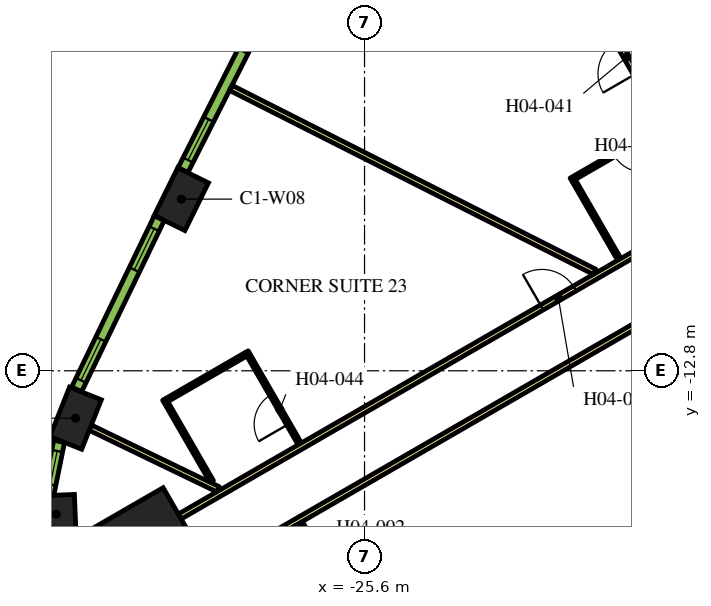
"""IFC4 building model, lengths in metres.
Left out: names, types, materials, properties, quantities, classifications, styles, units other than length and angle.
Written with IfcOpenShell. Run it as: python <this file> out.ifc"""

import sys

from ifc_helpers import new_model, si_unit, direction, frame, frame_2d, origin, origin_2d, place, context, subcontext, project, spatial, rectangle, extrude, element, fill, save


model = new_model("IFC4")
c1 = context("Model", 3, precision=1e-05, world=origin(), true_north=direction((0.0, 1.0)))
c2 = subcontext(c1, "Body", "Model", "MODEL_VIEW")
j1 = project(units=[si_unit("LENGTHUNIT", "METRE"), si_unit("PLANEANGLEUNIT", "RADIAN")], contexts=[c1])
p1 = place(None, origin())
s1 = spatial("IfcSite", under=j1, at=p1, CompositionType="ELEMENT")
p2 = place(p1, origin())
s2 = spatial("IfcBuilding", under=s1, at=p2, CompositionType="ELEMENT")
p3 = place(p2, frame((0.0, 0.0, 62.7)))
s3 = spatial("IfcBuildingStorey", under=s2, at=p3, CompositionType="ELEMENT", Elevation=62.7)
p4 = place(p3, frame((-31.522, -18.199, 0.0), z_axis=(0.0, 0.0, 1.0), x_axis=(-0.866025403784, -0.5, 0.0)))
e1 = element("IfcColumn", 1, at=p4, inside=s3, PredefinedType="COLUMN", context=c2, shape_type="SweptSolid", body=[
    extrude(rectangle(XDim=3.4, YDim=3.4, at=origin_2d()), origin(), (0.0, 0.0, 1.0), 3.9),
])
for number, where, z_axis, x_axis in (
    (2, (-30.421, -8.284, 0.0), (0.0, 0.0, 1.0), (-0.443, -0.897, 0.0)),
    (3, (-33.203, -14.047, 0.0), (0.0, 0.0, 1.0), (-0.369, -0.929, 0.0)),
):
    element("IfcColumn", number, at=place(p3, frame(where, z_axis=z_axis, x_axis=x_axis)), inside=s3, PredefinedType="COLUMN", context=c2, shape_type="SweptSolid", body=[
        extrude(rectangle(XDim=1.4, YDim=0.9, at=origin_2d()), origin(), (0.0, 0.0, 1.0), 3.9),
    ])
p5 = place(p3, frame((-33.713, -16.574, 0.0), z_axis=(0.0, 0.0, 1.0), x_axis=(0.041582693819, -0.999135065732, 0.0)))
e4 = element("IfcColumn", 4, at=p5, inside=s3, PredefinedType="COLUMN", context=c2, shape_type="SweptSolid", body=[
    extrude(rectangle(XDim=1.0, YDim=1.0, at=origin_2d()), origin(), (0.0, 0.0, 1.0), 3.9),
])
p6 = place(p3, frame((-16.412, -8.523, 0.0), z_axis=(0.0, 0.0, 1.0), x_axis=(-0.500001929737, 0.866024289647, 0.0)))
e5 = element("IfcWall", 5, at=p6, inside=s3, PredefinedType="PARTITIONING", context=c2, shape_type="SweptSolid", body=[
    extrude(rectangle(XDim=5.268, YDim=0.15, at=frame_2d((2.634, 0.0))), origin(), (0.0, 0.0, 1.0), 2.75),
])
p7 = place(p6, frame((4.088, 0.0, 0.0)))
e6 = element("IfcOpeningElement", 6, at=p7, cuts=e5, PredefinedType="OPENING", context=c2, shape_type="SweptSolid", body=[
    extrude(rectangle(XDim=1.0, YDim=2.1, at=frame_2d((0.5, 1.05))), frame((0.0, 0.085, 0.0), z_axis=(0.0, -1.0, 0.0), x_axis=(1.0, 0.0, 0.0)), (0.0, 0.0, 1.0), 0.17),
])
p8 = place(p3, frame((-30.463, -16.635, 0.0), z_axis=(0.0, 0.0, 1.0), x_axis=(0.866022394896, 0.500005211512, 0.0)))
e7 = element("IfcWall", 7, at=p8, inside=s3, PredefinedType="PARTITIONING", context=c2, shape_type="SweptSolid", body=[
    extrude(rectangle(XDim=16.144, YDim=0.15, at=frame_2d((8.072, 0.0))), origin(), (0.0, 0.0, 1.0), 2.75),
])
p9 = place(p8, frame((11.004, 0.0, 0.0)))
e8 = element("IfcOpeningElement", 8, at=p9, cuts=e7, PredefinedType="OPENING", context=c2, shape_type="SweptSolid", body=[
    extrude(rectangle(XDim=1.0, YDim=2.1, at=frame_2d((0.5, 1.05))), frame((0.0, 0.085, 0.0), z_axis=(0.0, -1.0, 0.0), x_axis=(1.0, 0.0, 0.0)), (0.0, 0.0, 1.0), 0.17),
])
p10 = place(p3, frame((-15.587, -9.952, 0.0), z_axis=(0.0, 0.0, 1.0), x_axis=(-0.866022197818, -0.500005552856, 0.0)))
e9 = element("IfcWall", 9, at=p10, inside=s3, PredefinedType="PARTITIONING", context=c2, shape_type="SweptSolid", body=[
    extrude(rectangle(XDim=16.224, YDim=0.15, at=frame_2d((8.112, 0.0))), origin(), (0.0, 0.0, 1.0), 2.75),
])
p11 = place(p10, frame((0.527, 0.0, 0.0)))
e10 = element("IfcOpeningElement", 10, at=p11, cuts=e9, PredefinedType="OPENING", context=c2, shape_type="SweptSolid", body=[
    extrude(rectangle(XDim=1.1, YDim=2.1, at=frame_2d((0.55, 1.05))), frame((0.0, 0.085, 0.0), z_axis=(0.0, -1.0, 0.0), x_axis=(1.0, 0.0, 0.0)), (0.0, 0.0, 1.0), 0.17),
])
p12 = place(p3, frame((-32.817, -14.296, 0.0), z_axis=(0.0, 0.0, 1.0), x_axis=(0.900616957918, -0.434613730927, 0.0)))
e11 = element("IfcWall", 11, at=p12, inside=s3, PredefinedType="PARTITIONING", context=c2, shape_type="SweptSolid", body=[
    extrude(rectangle(XDim=3.733, YDim=0.15, at=frame_2d((1.867, 0.0))), origin(), (0.0, 0.0, 1.0), 2.75),
])
p13 = place(p3, frame((-29.12, -5.356, 0.0), z_axis=(0.0, 0.0, 1.0), x_axis=(0.892401965553, -0.451241323327, 0.0)))
e12 = element("IfcWall", 12, at=p13, inside=s3, PredefinedType="PARTITIONING", context=c2, shape_type="SweptSolid", body=[
    extrude(rectangle(XDim=10.729, YDim=0.15, at=frame_2d((5.364, 0.0))), origin(), (0.0, 0.0, 1.0), 2.75),
])
p14 = place(p3, frame((-25.829, -19.3, 0.0), z_axis=(0.0, 0.0, 1.0), x_axis=(-0.50005036918, 0.865996321171, 0.0)))
e13 = element("IfcWall", 13, at=p14, inside=s3, PredefinedType="PARTITIONING", context=c2, shape_type="SweptSolid", body=[
    extrude(rectangle(XDim=2.9, YDim=0.1, at=frame_2d((1.45, 0.0))), origin(), (0.0, 0.0, 1.0), 2.75),
])
p15 = place(p14, frame((1.4, 0.0, 0.0)))
e14 = element("IfcOpeningElement", 14, at=p15, cuts=e13, PredefinedType="OPENING", context=c2, shape_type="SweptSolid", body=[
    extrude(rectangle(XDim=0.9, YDim=2.1, at=frame_2d((0.45, 1.05))), frame((0.0, 0.06, 0.0), z_axis=(0.0, -1.0, 0.0), x_axis=(1.0, 0.0, 0.0)), (0.0, 0.0, 1.0), 0.12),
])
p16 = place(p3, frame((-17.74, -6.373, 0.0), z_axis=(0.0, 0.0, 1.0), x_axis=(-0.866018616679, -0.500011755427, 0.0)))
e15 = element("IfcWall", 15, at=p16, inside=s3, PredefinedType="PARTITIONING", context=c2, shape_type="SweptSolid", body=[
    extrude(rectangle(XDim=2.8, YDim=0.1, at=frame_2d((1.4, 0.0))), origin(), (0.0, 0.0, 1.0), 2.75),
])
p17 = place(p16, frame((0.6, 0.0, 0.0)))
e16 = element("IfcOpeningElement", 16, at=p17, cuts=e15, PredefinedType="OPENING", context=c2, shape_type="SweptSolid", body=[
    extrude(rectangle(XDim=0.9, YDim=2.1, at=frame_2d((0.45, 1.05))), frame((0.0, 0.06, 0.0), z_axis=(0.0, -1.0, 0.0), x_axis=(1.0, 0.0, 0.0)), (0.0, 0.0, 1.0), 0.12),
])
p18 = place(p3, frame((-20.092, -7.8, 0.0), z_axis=(0.0, 0.0, 1.0), x_axis=(0.499940577336, -0.866059708757, 0.0)))
e17 = element("IfcWall", 17, at=p18, inside=s3, PredefinedType="PARTITIONING", context=c2, shape_type="SweptSolid", body=[
    extrude(rectangle(XDim=2.39, YDim=0.1, at=frame_2d((1.195, 0.0))), origin(), (0.0, 0.0, 1.0), 2.75),
])
p19 = place(p3, frame((-27.304, -14.725, 0.0), z_axis=(0.0, 0.0, 1.0), x_axis=(-0.49998411664, 0.866034573852, 0.0)))
e18 = element("IfcWall", 18, at=p19, inside=s3, PredefinedType="PARTITIONING", context=c2, shape_type="SweptSolid", body=[
    extrude(rectangle(XDim=2.8, YDim=0.1, at=frame_2d((1.4, 0.0))), origin(), (0.0, 0.0, 1.0), 2.75),
])
p20 = place(p19, frame((0.6, 0.0, 0.0)))
e19 = element("IfcOpeningElement", 19, at=p20, cuts=e18, PredefinedType="OPENING", context=c2, shape_type="SweptSolid", body=[
    extrude(rectangle(XDim=0.9, YDim=2.1, at=frame_2d((0.45, 1.05))), frame((0.0, 0.06, 0.0), z_axis=(0.0, -1.0, 0.0), x_axis=(1.0, 0.0, 0.0)), (0.0, 0.0, 1.0), 0.12),
])
p21 = place(p3, frame((-28.722, -12.368, 0.0), z_axis=(0.0, 0.0, 1.0), x_axis=(-0.866050077142, -0.499957262057, 0.0)))
e20 = element("IfcWall", 20, at=p21, inside=s3, PredefinedType="PARTITIONING", context=c2, shape_type="SweptSolid", body=[
    extrude(rectangle(XDim=2.4, YDim=0.1, at=frame_2d((1.2, 0.0))), origin(), (0.0, 0.0, 1.0), 2.75),
])
p22 = place(p3, frame((-29.619, -15.715, 0.0), z_axis=(0.0, 0.0, 1.0), x_axis=(-0.500004234368, 0.866022959057, 0.0)))
e21 = element("IfcWall", 21, at=p22, inside=s3, PredefinedType="PARTITIONING", context=c2, shape_type="SweptSolid", body=[
    extrude(rectangle(XDim=2.5, YDim=0.1, at=frame_2d((1.25, 0.0))), origin(), (0.0, 0.0, 1.0), 2.75),
])
p23 = place(p3, frame((-28.122, -3.06, 0.0), z_axis=(0.0, 0.0, 1.0), x_axis=(-0.451233929645, -0.892405704115, 0.0)))
e22 = element("IfcWall", 22, at=p23, inside=s3, PredefinedType="SOLIDWALL", context=c2, shape_type="SweptSolid", body=[
    extrude(rectangle(XDim=4.998, YDim=0.29, at=frame_2d((2.499, 0.0))), origin(), (0.0, 0.0, 1.0), 3.65),
])
p24 = place(p23, frame((0.297, 0.0, 0.9)))
e23 = element("IfcOpeningElement", 23, at=p24, cuts=e22, PredefinedType="OPENING", context=c2, shape_type="SweptSolid", body=[
    extrude(rectangle(XDim=1.2, YDim=2.15, at=frame_2d((0.6, 1.075))), frame((0.0, 0.155, 0.0), z_axis=(0.0, -1.0, 0.0), x_axis=(1.0, 0.0, 0.0)), (0.0, 0.0, 1.0), 0.31),
])
p25 = place(p23, frame((3.501, 0.0, 0.9)))
e24 = element("IfcOpeningElement", 24, at=p25, cuts=e22, PredefinedType="OPENING", context=c2, shape_type="SweptSolid", body=[
    extrude(rectangle(XDim=1.2, YDim=2.15, at=frame_2d((0.6, 1.075))), frame((0.0, 0.155, 0.0), z_axis=(0.0, -1.0, 0.0), x_axis=(1.0, 0.0, 0.0)), (0.0, 0.0, 1.0), 0.31),
])
p26 = place(p3, frame((-31.0, -8.782, 0.0), z_axis=(0.0, 0.0, 1.0), x_axis=(-0.434664499056, -0.900592456808, 0.0)))
e25 = element("IfcWall", 25, at=p26, inside=s3, PredefinedType="SOLIDWALL", context=c2, shape_type="SweptSolid", body=[
    extrude(rectangle(XDim=5.006, YDim=0.29, at=frame_2d((2.503, 0.0))), origin(), (0.0, 0.0, 1.0), 3.65),
])
p27 = place(p26, frame((0.31, 0.0, 0.9)))
e26 = element("IfcOpeningElement", 26, at=p27, cuts=e25, PredefinedType="OPENING", context=c2, shape_type="SweptSolid", body=[
    extrude(rectangle(XDim=1.2, YDim=2.15, at=frame_2d((0.6, 1.075))), frame((0.0, 0.155, 0.0), z_axis=(0.0, -1.0, 0.0), x_axis=(1.0, 0.0, 0.0)), (0.0, 0.0, 1.0), 0.31),
])
p28 = place(p26, frame((3.541, 0.0, 0.9)))
e27 = element("IfcOpeningElement", 27, at=p28, cuts=e25, PredefinedType="OPENING", context=c2, shape_type="SweptSolid", body=[
    extrude(rectangle(XDim=1.2, YDim=2.15, at=frame_2d((0.6, 1.075))), frame((0.0, 0.155, 0.0), z_axis=(0.0, -1.0, 0.0), x_axis=(1.0, 0.0, 0.0)), (0.0, 0.0, 1.0), 0.31),
])
p29 = place(p3, frame((-33.637, -14.657, 0.0), z_axis=(0.0, 0.0, 1.0), x_axis=(-0.198106888228, -0.980180422594, 0.0)))
e28 = element("IfcWall", 28, at=p29, inside=s3, PredefinedType="SOLIDWALL", context=c2, shape_type="SweptSolid", body=[
    extrude(rectangle(XDim=1.415, YDim=0.29, at=frame_2d((0.708, 0.0))), origin(), (0.0, 0.0, 1.0), 3.65),
])
p30 = place(p29, frame((0.257, 0.0, 0.9)))
e29 = element("IfcOpeningElement", 29, at=p30, cuts=e28, PredefinedType="OPENING", context=c2, shape_type="SweptSolid", body=[
    extrude(rectangle(XDim=0.9, YDim=2.15, at=frame_2d((0.45, 1.075))), frame((0.0, 0.155, 0.0), z_axis=(0.0, -1.0, 0.0), x_axis=(1.0, 0.0, 0.0)), (0.0, 0.0, 1.0), 0.31),
])
p31 = place(p7, origin())
e30 = element("IfcDoor", 30, at=p31, inside=s3, OperationType="SINGLE_SWING_RIGHT", PredefinedType="DOOR", context=c2, shape_type="SweptSolid", body=[
    extrude(rectangle(XDim=1.0, YDim=2.1, at=frame_2d((0.5, 1.05))), frame((0.0, 0.025, 0.0), z_axis=(0.0, -1.0, 0.0), x_axis=(1.0, 0.0, 0.0)), (0.0, 0.0, 1.0), 0.05),
])
fill(e6, e30)
p32 = place(p17, origin())
e31 = element("IfcDoor", 31, at=p32, inside=s3, OperationType="SINGLE_SWING_LEFT", PredefinedType="DOOR", context=c2, shape_type="SweptSolid", body=[
    extrude(rectangle(XDim=0.9, YDim=2.1, at=frame_2d((0.45, 1.05))), frame((0.0, 0.025, 0.0), z_axis=(0.0, -1.0, 0.0), x_axis=(1.0, 0.0, 0.0)), (0.0, 0.0, 1.0), 0.05),
])
fill(e16, e31)
p33 = place(p9, origin())
e32 = element("IfcDoor", 32, at=p33, inside=s3, OperationType="SINGLE_SWING_RIGHT", PredefinedType="DOOR", context=c2, shape_type="SweptSolid", body=[
    extrude(rectangle(XDim=1.0, YDim=2.1, at=frame_2d((0.5, 1.05))), frame((0.0, 0.025, 0.0), z_axis=(0.0, -1.0, 0.0), x_axis=(1.0, 0.0, 0.0)), (0.0, 0.0, 1.0), 0.05),
])
fill(e8, e32)
p34 = place(p20, origin())
e33 = element("IfcDoor", 33, at=p34, inside=s3, OperationType="SINGLE_SWING_LEFT", PredefinedType="DOOR", context=c2, shape_type="SweptSolid", body=[
    extrude(rectangle(XDim=0.9, YDim=2.1, at=frame_2d((0.45, 1.05))), frame((0.0, 0.025, 0.0), z_axis=(0.0, -1.0, 0.0), x_axis=(1.0, 0.0, 0.0)), (0.0, 0.0, 1.0), 0.05),
])
fill(e19, e33)
p35 = place(p25, origin())
e34 = element("IfcWindow", 34, at=p35, inside=s3, PartitioningType="DOUBLE_PANEL_VERTICAL", PredefinedType="WINDOW", context=c2, shape_type="SweptSolid", body=[
    extrude(rectangle(XDim=1.2, YDim=2.15, at=frame_2d((0.6, 1.075))), frame((0.0, 0.015, 0.0), z_axis=(0.0, -1.0, 0.0), x_axis=(1.0, 0.0, 0.0)), (0.0, 0.0, 1.0), 0.06),
])
fill(e24, e34)
p36 = place(p27, origin())
e35 = element("IfcWindow", 35, at=p36, inside=s3, PartitioningType="DOUBLE_PANEL_VERTICAL", PredefinedType="WINDOW", context=c2, shape_type="SweptSolid", body=[
    extrude(rectangle(XDim=1.2, YDim=2.15, at=frame_2d((0.6, 1.075))), frame((0.0, 0.015, 0.0), z_axis=(0.0, -1.0, 0.0), x_axis=(1.0, 0.0, 0.0)), (0.0, 0.0, 1.0), 0.06),
])
fill(e26, e35)
p37 = place(p28, origin())
e36 = element("IfcWindow", 36, at=p37, inside=s3, PartitioningType="DOUBLE_PANEL_VERTICAL", PredefinedType="WINDOW", context=c2, shape_type="SweptSolid", body=[
    extrude(rectangle(XDim=1.2, YDim=2.15, at=frame_2d((0.6, 1.075))), frame((0.0, 0.015, 0.0), z_axis=(0.0, -1.0, 0.0), x_axis=(1.0, 0.0, 0.0)), (0.0, 0.0, 1.0), 0.06),
])
fill(e27, e36)
p38 = place(p30, origin())
e37 = element("IfcWindow", 37, at=p38, inside=s3, PartitioningType="SINGLE_PANEL", PredefinedType="WINDOW", context=c2, shape_type="SweptSolid", body=[
    extrude(rectangle(XDim=0.9, YDim=2.15, at=frame_2d((0.45, 1.075))), frame((0.0, 0.015, 0.0), z_axis=(0.0, -1.0, 0.0), x_axis=(1.0, 0.0, 0.0)), (0.0, 0.0, 1.0), 0.06),
])
fill(e29, e37)
save(model, sys.argv[1])
